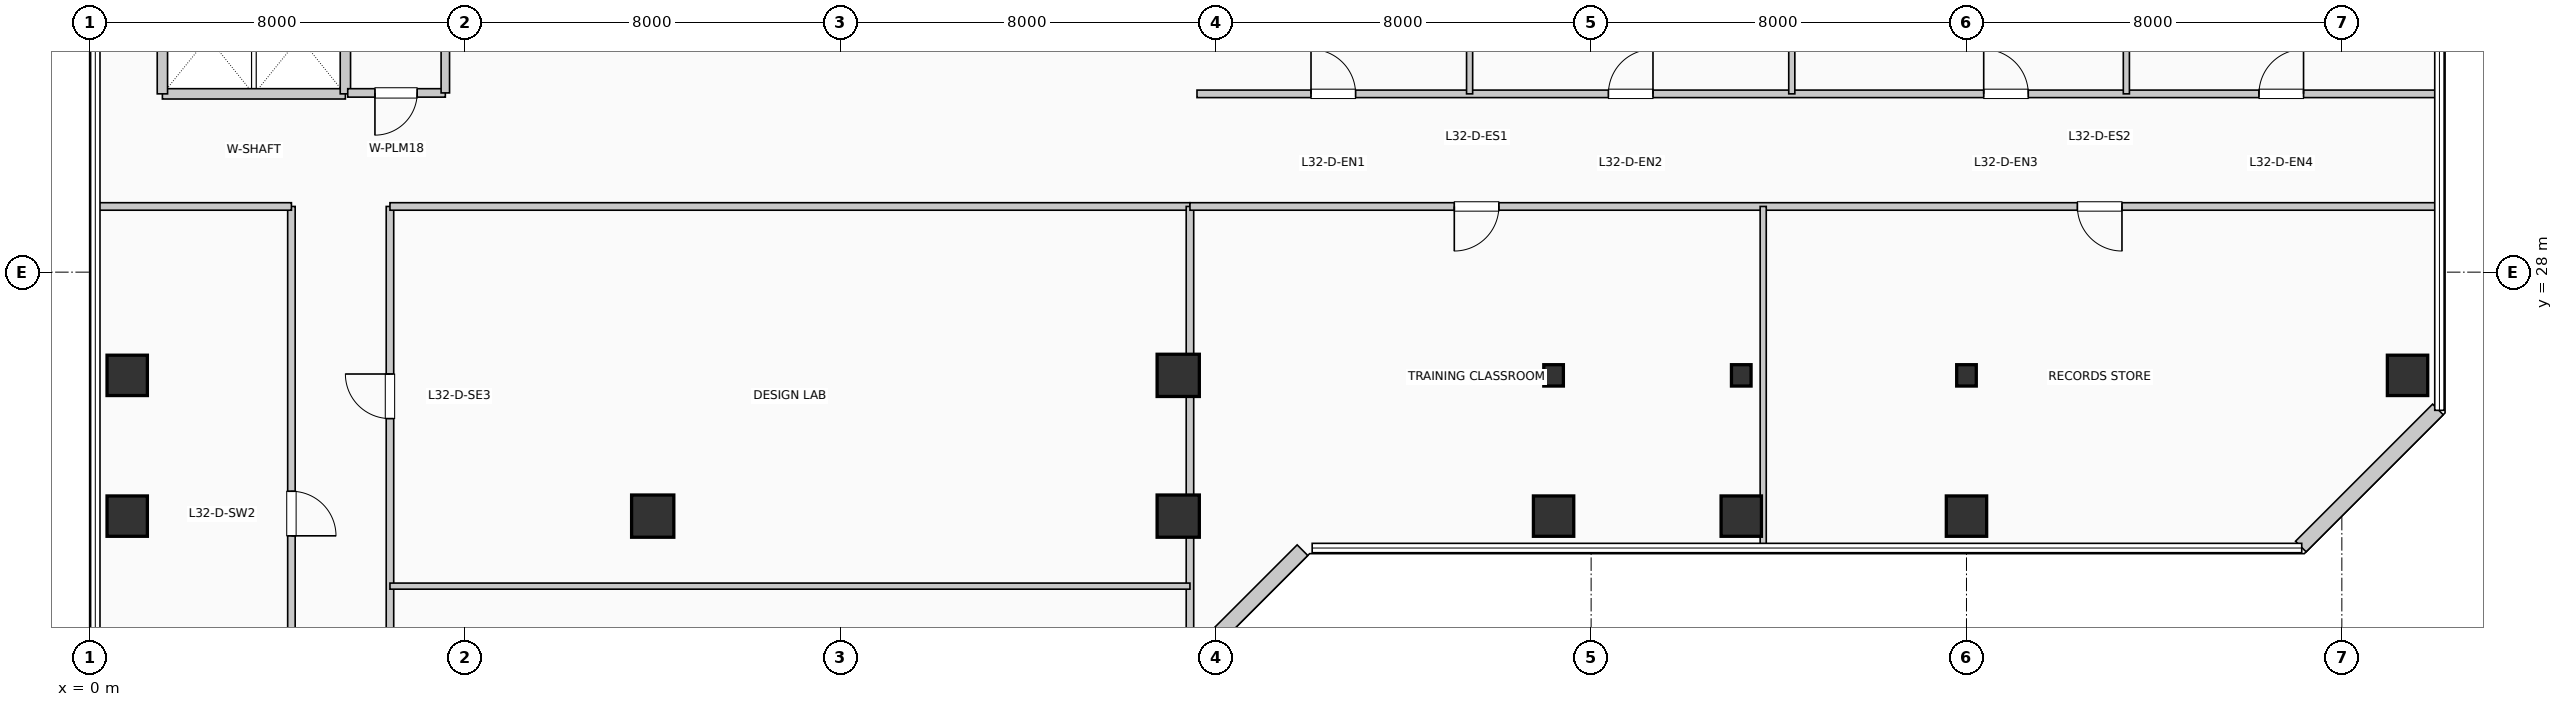
"""IFC4 building model, lengths in metres.
Left out: names, types, materials, properties, quantities, classifications, styles, units other than length and angle.
Written with IfcOpenShell. Run it as: python <this file> out.ifc"""

import sys

from ifc_helpers import new_model, si_unit, direction, frame, frame_2d, origin, origin_2d, place, context, subcontext, project, spatial, rectangle, i_section, extrude, element, fill, save


model = new_model("IFC4")
c1 = context("Model", 3, precision=1e-05, world=origin(), true_north=direction((0.0, 1.0)))
c2 = subcontext(c1, "Body", "Model", "MODEL_VIEW")
j1 = project(units=[si_unit("LENGTHUNIT", "METRE"), si_unit("PLANEANGLEUNIT", "RADIAN")], contexts=[c1])
p1 = place(None, origin())
s1 = spatial("IfcSite", under=j1, at=p1, CompositionType="ELEMENT")
p2 = place(p1, origin())
s2 = spatial("IfcBuilding", under=s1, at=p2, CompositionType="ELEMENT")
p3 = place(p2, frame((0.0, 0.0, 134.97)))
s3 = spatial("IfcBuildingStorey", under=s2, at=p3, CompositionType="ELEMENT", Elevation=134.97)
for number, where, z_axis, x_axis in (
    (1, (0.8, 22.8, 0.0), (0.0, 0.0, 1.0), (1.0, 0.0, 0.0)),
    (2, (0.8, 25.8, 0.0), (0.0, 0.0, 1.0), (1.0, 0.0, 0.0)),
):
    element("IfcColumn", number, at=place(p3, frame(where, z_axis=z_axis, x_axis=x_axis)), inside=s3, PredefinedType="COLUMN", context=c2, shape_type="SweptSolid", body=[
        extrude(rectangle(XDim=0.86, YDim=0.86, at=origin_2d()), origin(), (0.0, 0.0, 1.0), 3.96),
    ])
for number, where, z_axis, x_axis in (
    (3, (12.0, 22.8, 0.0), (0.0, 0.0, 1.0), (1.0, 0.0, 0.0)),
    (4, (23.2, 22.8, 0.0), (0.0, 0.0, 1.0), (1.0, 0.0, 0.0)),
    (5, (23.2, 25.8, 0.0), (0.0, 0.0, 1.0), (1.0, 0.0, 0.0)),
):
    element("IfcColumn", number, at=place(p3, frame(where, z_axis=z_axis, x_axis=x_axis)), inside=s3, PredefinedType="COLUMN", context=c2, shape_type="SweptSolid", body=[
        extrude(rectangle(XDim=0.9, YDim=0.9, at=origin_2d()), origin(), (0.0, 0.0, 1.0), 3.96),
    ])
p4 = place(p3, frame((31.2, 22.8, 0.0), z_axis=(0.0, 0.0, 1.0), x_axis=(1.0, 0.0, 0.0)))
e6 = element("IfcColumn", 6, at=p4, inside=s3, PredefinedType="COLUMN", context=c2, shape_type="SweptSolid", body=[
    extrude(rectangle(XDim=0.86, YDim=0.86, at=origin_2d()), origin(), (0.0, 0.0, 1.0), 3.96),
])
p5 = place(p3, frame((31.2, 25.8, 0.0), z_axis=(0.0, 0.0, 1.0), x_axis=(1.0, 0.0, 0.0)))
e7 = element("IfcColumn", 7, at=p5, inside=s3, PredefinedType="COLUMN", context=c2, shape_type="SweptSolid", body=[
    extrude(i_section(OverallWidth=0.418, OverallDepth=0.455, WebThickness=0.032, FlangeThickness=0.051, at=origin_2d()), origin(), (0.0, 0.0, 1.0), 3.96),
])
p6 = place(p3, frame((35.2, 22.8, 0.0), z_axis=(0.0, 0.0, 1.0), x_axis=(1.0, 0.0, 0.0)))
e8 = element("IfcColumn", 8, at=p6, inside=s3, PredefinedType="COLUMN", context=c2, shape_type="SweptSolid", body=[
    extrude(rectangle(XDim=0.86, YDim=0.86, at=origin_2d()), origin(), (0.0, 0.0, 1.0), 3.96),
])
p7 = place(p3, frame((35.2, 25.8, 0.0), z_axis=(0.0, 0.0, 1.0), x_axis=(1.0, 0.0, 0.0)))
e9 = element("IfcColumn", 9, at=p7, inside=s3, PredefinedType="COLUMN", context=c2, shape_type="SweptSolid", body=[
    extrude(i_section(OverallWidth=0.418, OverallDepth=0.455, WebThickness=0.032, FlangeThickness=0.051, at=origin_2d()), origin(), (0.0, 0.0, 1.0), 3.96),
])
p8 = place(p3, frame((40.0, 22.8, 0.0), z_axis=(0.0, 0.0, 1.0), x_axis=(1.0, 0.0, 0.0)))
e10 = element("IfcColumn", 10, at=p8, inside=s3, PredefinedType="COLUMN", context=c2, shape_type="SweptSolid", body=[
    extrude(rectangle(XDim=0.86, YDim=0.86, at=origin_2d()), origin(), (0.0, 0.0, 1.0), 3.96),
])
p9 = place(p3, frame((40.0, 25.8, 0.0), z_axis=(0.0, 0.0, 1.0), x_axis=(1.0, 0.0, 0.0)))
e11 = element("IfcColumn", 11, at=p9, inside=s3, PredefinedType="COLUMN", context=c2, shape_type="SweptSolid", body=[
    extrude(i_section(OverallWidth=0.418, OverallDepth=0.455, WebThickness=0.032, FlangeThickness=0.051, at=origin_2d()), origin(), (0.0, 0.0, 1.0), 3.96),
])
p10 = place(p3, frame((49.4, 25.8, 0.0), z_axis=(0.0, 0.0, 1.0), x_axis=(1.0, 0.0, 0.0)))
e12 = element("IfcColumn", 12, at=p10, inside=s3, PredefinedType="COLUMN", context=c2, shape_type="SweptSolid", body=[
    extrude(rectangle(XDim=0.86, YDim=0.86, at=origin_2d()), origin(), (0.0, 0.0, 1.0), 3.96),
])
p11 = place(p3, frame((23.926, 20.152, 0.0), z_axis=(0.0, 0.0, 1.0), x_axis=(0.707106781187, 0.707106781187, 0.0)))
e13 = element("IfcWall", 13, at=p11, inside=s3, PredefinedType="SOLIDWALL", context=c2, shape_type="SweptSolid", body=[
    extrude(rectangle(XDim=2.718, YDim=0.32, at=frame_2d((1.359, 0.0))), origin(), (0.0, 0.0, 1.0), 3.71),
])
p12 = place(p3, frame((47.126, 22.152, 0.0), z_axis=(0.0, 0.0, 1.0), x_axis=(0.707136318428, 0.707077242712, 0.0)))
e14 = element("IfcWall", 14, at=p12, inside=s3, PredefinedType="SOLIDWALL", context=c2, shape_type="SweptSolid", body=[
    extrude(rectangle(XDim=4.133, YDim=0.32, at=frame_2d((2.066, 0.0))), origin(), (0.0, 0.0, 1.0), 3.71),
])
p13 = place(p3, frame((1.55, 31.8, 0.0), z_axis=(0.0, 0.0, 1.0), x_axis=(1.0, 0.0, 0.0)))
e15 = element("IfcWall", 15, at=p13, inside=s3, PredefinedType="PARTITIONING", context=c2, shape_type="SweptSolid", body=[
    extrude(rectangle(XDim=3.9, YDim=0.22, at=frame_2d((1.95, 0.0))), origin(), (0.0, 0.0, 1.0), 3.71),
])
for number, where, z_axis, x_axis in (
    (16, (1.55, 31.8, 0.0), (0.0, 0.0, 1.0), (0.0, 1.0, 0.0)),
    (17, (5.45, 31.8, 0.0), (0.0, 0.0, 1.0), (0.0, 1.0, 0.0)),
):
    element("IfcWall", number, at=place(p3, frame(where, z_axis=z_axis, x_axis=x_axis)), inside=s3, PredefinedType="PARTITIONING", context=c2, shape_type="SweptSolid", body=[
        extrude(rectangle(XDim=2.38, YDim=0.22, at=frame_2d((1.19, 0.0))), origin(), (0.0, 0.0, 1.0), 3.71),
    ])
p14 = place(p3, frame((5.5, 31.82, 0.0), z_axis=(0.0, 0.0, 1.0), x_axis=(1.0, 0.0, 0.0)))
e18 = element("IfcWall", 18, at=p14, inside=s3, PredefinedType="PLUMBINGWALL", context=c2, shape_type="SweptSolid", body=[
    extrude(rectangle(XDim=2.08, YDim=0.18, at=frame_2d((1.04, 0.0))), origin(), (0.0, 0.0, 1.0), 3.71),
])
p15 = place(p14, frame((1.48, 0.0, 0.0), z_axis=(0.0, 0.0, 1.0), x_axis=(-1.0, 0.0, 0.0)))
e19 = element("IfcOpeningElement", 19, at=p15, cuts=e18, PredefinedType="OPENING", context=c2, shape_type="SweptSolid", body=[
    extrude(rectangle(XDim=0.9, YDim=2.1, at=frame_2d((0.45, 1.05))), frame((0.0, 0.1, 0.0), z_axis=(0.0, -1.0, 0.0), x_axis=(1.0, 0.0, 0.0)), (0.0, 0.0, 1.0), 0.2),
])
p16 = place(p3, frame((7.58, 31.82, 0.0), z_axis=(0.0, 0.0, 1.0), x_axis=(0.0, 1.0, 0.0)))
e20 = element("IfcWall", 20, at=p16, inside=s3, PredefinedType="PLUMBINGWALL", context=c2, shape_type="SweptSolid", body=[
    extrude(rectangle(XDim=2.36, YDim=0.18, at=frame_2d((1.18, 0.0))), origin(), (0.0, 0.0, 1.0), 3.71),
])
p17 = place(p3, frame((4.3, 5.6, 0.0), z_axis=(0.0, 0.0, 1.0), x_axis=(0.0, 1.0, 0.0)))
e21 = element("IfcWall", 21, at=p17, inside=s3, PredefinedType="PARTITIONING", context=c2, shape_type="SweptSolid", body=[
    extrude(rectangle(XDim=23.8, YDim=0.16, at=frame_2d((11.9, 0.0))), origin(), (0.0, 0.0, 1.0), 3.71),
])
p18 = place(p17, frame((5.83, 0.0, 0.0), z_axis=(0.0, 0.0, 1.0), x_axis=(-1.0, 0.0, 0.0)))
e22 = element("IfcOpeningElement", 22, at=p18, cuts=e21, PredefinedType="OPENING", context=c2, shape_type="SweptSolid", body=[
    extrude(rectangle(XDim=0.95, YDim=2.15, at=frame_2d((0.475, 1.075))), frame((0.0, 0.09, 0.0), z_axis=(0.0, -1.0, 0.0), x_axis=(1.0, 0.0, 0.0)), (0.0, 0.0, 1.0), 0.18),
])
p19 = place(p17, frame((17.73, 0.0, 0.0), z_axis=(0.0, 0.0, 1.0), x_axis=(-1.0, 0.0, 0.0)))
e23 = element("IfcOpeningElement", 23, at=p19, cuts=e21, PredefinedType="OPENING", context=c2, shape_type="SweptSolid", body=[
    extrude(rectangle(XDim=0.95, YDim=2.15, at=frame_2d((0.475, 1.075))), frame((0.0, 0.09, 0.0), z_axis=(0.0, -1.0, 0.0), x_axis=(1.0, 0.0, 0.0)), (0.0, 0.0, 1.0), 0.18),
])
p20 = place(p3, frame((6.4, 5.6, 0.0), z_axis=(0.0, 0.0, 1.0), x_axis=(0.0, 1.0, 0.0)))
e24 = element("IfcWall", 24, at=p20, inside=s3, PredefinedType="PARTITIONING", context=c2, shape_type="SweptSolid", body=[
    extrude(rectangle(XDim=23.8, YDim=0.16, at=frame_2d((11.9, 0.0))), origin(), (0.0, 0.0, 1.0), 3.71),
])
p21 = place(p20, frame((3.333, 0.0, 0.0)))
e25 = element("IfcOpeningElement", 25, at=p21, cuts=e24, PredefinedType="OPENING", context=c2, shape_type="SweptSolid", body=[
    extrude(rectangle(XDim=0.95, YDim=2.15, at=frame_2d((0.475, 1.075))), frame((0.0, 0.09, 0.0), z_axis=(0.0, -1.0, 0.0), x_axis=(1.0, 0.0, 0.0)), (0.0, 0.0, 1.0), 0.18),
])
p22 = place(p20, frame((11.187, 0.0, 0.0)))
e26 = element("IfcOpeningElement", 26, at=p22, cuts=e24, PredefinedType="OPENING", context=c2, shape_type="SweptSolid", body=[
    extrude(rectangle(XDim=0.95, YDim=2.15, at=frame_2d((0.475, 1.075))), frame((0.0, 0.09, 0.0), z_axis=(0.0, -1.0, 0.0), x_axis=(1.0, 0.0, 0.0)), (0.0, 0.0, 1.0), 0.18),
])
p23 = place(p20, frame((19.279, 0.0, 0.0)))
e27 = element("IfcOpeningElement", 27, at=p23, cuts=e24, PredefinedType="OPENING", context=c2, shape_type="SweptSolid", body=[
    extrude(rectangle(XDim=0.95, YDim=2.15, at=frame_2d((0.475, 1.075))), frame((0.0, 0.09, 0.0), z_axis=(0.0, -1.0, 0.0), x_axis=(1.0, 0.0, 0.0)), (0.0, 0.0, 1.0), 0.18),
])
p24 = place(p3, frame((0.19, 29.4, 0.0), z_axis=(0.0, 0.0, 1.0), x_axis=(1.0, 0.0, 0.0)))
e28 = element("IfcWall", 28, at=p24, inside=s3, PredefinedType="PARTITIONING", context=c2, shape_type="SweptSolid", body=[
    extrude(rectangle(XDim=4.11, YDim=0.16, at=frame_2d((2.055, 0.0))), origin(), (0.0, 0.0, 1.0), 3.365),
])
p25 = place(p3, frame((6.4, 29.4, 0.0), z_axis=(0.0, 0.0, 1.0), x_axis=(1.0, 0.0, 0.0)))
e29 = element("IfcWall", 29, at=p25, inside=s3, PredefinedType="PARTITIONING", context=c2, shape_type="SweptSolid", body=[
    extrude(rectangle(XDim=17.05, YDim=0.16, at=frame_2d((8.525, 0.0))), origin(), (0.0, 0.0, 1.0), 3.365),
])
p26 = place(p3, frame((23.45, 0.19, 0.0), z_axis=(0.0, 0.0, 1.0), x_axis=(0.0, 1.0, 0.0)))
e30 = element("IfcWall", 30, at=p26, inside=s3, PredefinedType="PARTITIONING", context=c2, shape_type="SweptSolid", body=[
    extrude(rectangle(XDim=29.21, YDim=0.16, at=frame_2d((14.605, 0.0))), origin(), (0.0, 0.0, 1.0), 3.045),
])
p27 = place(p3, frame((6.4, 21.308, 0.0), z_axis=(0.0, 0.0, 1.0), x_axis=(1.0, 0.0, 0.0)))
e31 = element("IfcWall", 31, at=p27, inside=s3, PredefinedType="PARTITIONING", context=c2, shape_type="SweptSolid", body=[
    extrude(rectangle(XDim=17.05, YDim=0.13, at=frame_2d((8.525, 0.0))), origin(), (0.0, 0.0, 1.0), 3.71),
])
p28 = place(p3, frame((23.45, 29.4, 0.0), z_axis=(0.0, 0.0, 1.0), x_axis=(1.0, 0.0, 0.0)))
e32 = element("IfcWall", 32, at=p28, inside=s3, PredefinedType="PARTITIONING", context=c2, shape_type="SweptSolid", body=[
    extrude(rectangle(XDim=26.56, YDim=0.16, at=frame_2d((13.28, 0.0))), origin(), (0.0, 0.0, 1.0), 3.365),
])
p29 = place(p28, frame((6.584, 0.0, 0.0), z_axis=(0.0, 0.0, 1.0), x_axis=(-1.0, 0.0, 0.0)))
e33 = element("IfcOpeningElement", 33, at=p29, cuts=e32, PredefinedType="OPENING", context=c2, shape_type="SweptSolid", body=[
    extrude(rectangle(XDim=0.95, YDim=2.15, at=frame_2d((0.475, 1.075))), frame((0.0, 0.09, 0.0), z_axis=(0.0, -1.0, 0.0), x_axis=(1.0, 0.0, 0.0)), (0.0, 0.0, 1.0), 0.18),
])
p30 = place(p28, frame((19.864, 0.0, 0.0), z_axis=(0.0, 0.0, 1.0), x_axis=(-1.0, 0.0, 0.0)))
e34 = element("IfcOpeningElement", 34, at=p30, cuts=e32, PredefinedType="OPENING", context=c2, shape_type="SweptSolid", body=[
    extrude(rectangle(XDim=0.95, YDim=2.15, at=frame_2d((0.475, 1.075))), frame((0.0, 0.09, 0.0), z_axis=(0.0, -1.0, 0.0), x_axis=(1.0, 0.0, 0.0)), (0.0, 0.0, 1.0), 0.18),
])
p31 = place(p3, frame((23.6, 31.8, 0.0), z_axis=(0.0, 0.0, 1.0), x_axis=(1.0, 0.0, 0.0)))
e35 = element("IfcWall", 35, at=p31, inside=s3, PredefinedType="PARTITIONING", context=c2, shape_type="SweptSolid", body=[
    extrude(rectangle(XDim=26.41, YDim=0.16, at=frame_2d((13.205, 0.0))), origin(), (0.0, 0.0, 1.0), 3.71),
])
p32 = place(p31, frame((2.43, 0.0, 0.0)))
e36 = element("IfcOpeningElement", 36, at=p32, cuts=e35, PredefinedType="OPENING", context=c2, shape_type="SweptSolid", body=[
    extrude(rectangle(XDim=0.95, YDim=2.15, at=frame_2d((0.475, 1.075))), frame((0.0, 0.09, 0.0), z_axis=(0.0, -1.0, 0.0), x_axis=(1.0, 0.0, 0.0)), (0.0, 0.0, 1.0), 0.18),
])
p33 = place(p31, frame((8.769, 0.0, 0.0)))
e37 = element("IfcOpeningElement", 37, at=p33, cuts=e35, PredefinedType="OPENING", context=c2, shape_type="SweptSolid", body=[
    extrude(rectangle(XDim=0.95, YDim=2.15, at=frame_2d((0.475, 1.075))), frame((0.0, 0.09, 0.0), z_axis=(0.0, -1.0, 0.0), x_axis=(1.0, 0.0, 0.0)), (0.0, 0.0, 1.0), 0.18),
])
p34 = place(p31, frame((16.767, 0.0, 0.0)))
e38 = element("IfcOpeningElement", 38, at=p34, cuts=e35, PredefinedType="OPENING", context=c2, shape_type="SweptSolid", body=[
    extrude(rectangle(XDim=0.95, YDim=2.15, at=frame_2d((0.475, 1.075))), frame((0.0, 0.09, 0.0), z_axis=(0.0, -1.0, 0.0), x_axis=(1.0, 0.0, 0.0)), (0.0, 0.0, 1.0), 0.18),
])
p35 = place(p31, frame((22.634, 0.0, 0.0)))
e39 = element("IfcOpeningElement", 39, at=p35, cuts=e35, PredefinedType="OPENING", context=c2, shape_type="SweptSolid", body=[
    extrude(rectangle(XDim=0.95, YDim=2.15, at=frame_2d((0.475, 1.075))), frame((0.0, 0.09, 0.0), z_axis=(0.0, -1.0, 0.0), x_axis=(1.0, 0.0, 0.0)), (0.0, 0.0, 1.0), 0.18),
])
p36 = place(p3, frame((35.667, 22.19, 0.0), z_axis=(0.0, 0.0, 1.0), x_axis=(0.0, 1.0, 0.0)))
e40 = element("IfcWall", 40, at=p36, inside=s3, PredefinedType="PARTITIONING", context=c2, shape_type="SweptSolid", body=[
    extrude(rectangle(XDim=7.21, YDim=0.13, at=frame_2d((3.605, 0.0))), origin(), (0.0, 0.0, 1.0), 3.045),
])
for number, where, z_axis, x_axis in (
    (41, (29.41, 31.8, 0.0), (0.0, 0.0, 1.0), (0.0, 1.0, 0.0)),
    (42, (36.277, 31.8, 0.0), (0.0, 0.0, 1.0), (0.0, 1.0, 0.0)),
    (43, (43.407, 31.8, 0.0), (0.0, 0.0, 1.0), (0.0, 1.0, 0.0)),
):
    element("IfcWall", number, at=place(p3, frame(where, z_axis=z_axis, x_axis=x_axis)), inside=s3, PredefinedType="PARTITIONING", context=c2, shape_type="SweptSolid", body=[
        extrude(rectangle(XDim=14.01, YDim=0.13, at=frame_2d((7.005, 0.0))), origin(), (0.0, 0.0, 1.0), 3.71),
    ])
p37 = place(p15, origin())
e44 = element("IfcDoor", 44, at=p37, inside=s3, OperationType="SINGLE_SWING_LEFT", PredefinedType="DOOR", context=c2, shape_type="SweptSolid", body=[
    extrude(rectangle(XDim=0.9, YDim=2.1, at=frame_2d((0.45, 1.05))), frame((0.0, 0.025, 0.0), z_axis=(0.0, -1.0, 0.0), x_axis=(1.0, 0.0, 0.0)), (0.0, 0.0, 1.0), 0.05),
])
fill(e19, e44)
p38 = place(p19, origin())
e45 = element("IfcDoor", 45, at=p38, inside=s3, OperationType="SINGLE_SWING_LEFT", PredefinedType="DOOR", context=c2, shape_type="SweptSolid", body=[
    extrude(rectangle(XDim=0.95, YDim=2.15, at=frame_2d((0.475, 1.075))), frame((0.0, 0.025, 0.0), z_axis=(0.0, -1.0, 0.0), x_axis=(1.0, 0.0, 0.0)), (0.0, 0.0, 1.0), 0.05),
])
fill(e23, e45)
p39 = place(p23, origin())
e46 = element("IfcDoor", 46, at=p39, inside=s3, OperationType="SINGLE_SWING_RIGHT", PredefinedType="DOOR", context=c2, shape_type="SweptSolid", body=[
    extrude(rectangle(XDim=0.95, YDim=2.15, at=frame_2d((0.475, 1.075))), frame((0.0, 0.025, 0.0), z_axis=(0.0, -1.0, 0.0), x_axis=(1.0, 0.0, 0.0)), (0.0, 0.0, 1.0), 0.05),
])
fill(e27, e46)
p40 = place(p29, origin())
e47 = element("IfcDoor", 47, at=p40, inside=s3, OperationType="SINGLE_SWING_LEFT", PredefinedType="DOOR", context=c2, shape_type="SweptSolid", body=[
    extrude(rectangle(XDim=0.95, YDim=2.15, at=frame_2d((0.475, 1.075))), frame((0.0, 0.025, 0.0), z_axis=(0.0, -1.0, 0.0), x_axis=(1.0, 0.0, 0.0)), (0.0, 0.0, 1.0), 0.05),
])
fill(e33, e47)
p41 = place(p30, origin())
e48 = element("IfcDoor", 48, at=p41, inside=s3, OperationType="SINGLE_SWING_RIGHT", PredefinedType="DOOR", context=c2, shape_type="SweptSolid", body=[
    extrude(rectangle(XDim=0.95, YDim=2.15, at=frame_2d((0.475, 1.075))), frame((0.0, 0.025, 0.0), z_axis=(0.0, -1.0, 0.0), x_axis=(1.0, 0.0, 0.0)), (0.0, 0.0, 1.0), 0.05),
])
fill(e34, e48)
p42 = place(p32, origin())
e49 = element("IfcDoor", 49, at=p42, inside=s3, OperationType="SINGLE_SWING_LEFT", PredefinedType="DOOR", context=c2, shape_type="SweptSolid", body=[
    extrude(rectangle(XDim=0.95, YDim=2.15, at=frame_2d((0.475, 1.075))), frame((0.0, 0.025, 0.0), z_axis=(0.0, -1.0, 0.0), x_axis=(1.0, 0.0, 0.0)), (0.0, 0.0, 1.0), 0.05),
])
fill(e36, e49)
p43 = place(p33, origin())
e50 = element("IfcDoor", 50, at=p43, inside=s3, OperationType="SINGLE_SWING_RIGHT", PredefinedType="DOOR", context=c2, shape_type="SweptSolid", body=[
    extrude(rectangle(XDim=0.95, YDim=2.15, at=frame_2d((0.475, 1.075))), frame((0.0, 0.025, 0.0), z_axis=(0.0, -1.0, 0.0), x_axis=(1.0, 0.0, 0.0)), (0.0, 0.0, 1.0), 0.05),
])
fill(e37, e50)
p44 = place(p34, origin())
e51 = element("IfcDoor", 51, at=p44, inside=s3, OperationType="SINGLE_SWING_LEFT", PredefinedType="DOOR", context=c2, shape_type="SweptSolid", body=[
    extrude(rectangle(XDim=0.95, YDim=2.15, at=frame_2d((0.475, 1.075))), frame((0.0, 0.025, 0.0), z_axis=(0.0, -1.0, 0.0), x_axis=(1.0, 0.0, 0.0)), (0.0, 0.0, 1.0), 0.05),
])
fill(e38, e51)
p45 = place(p35, origin())
e52 = element("IfcDoor", 52, at=p45, inside=s3, OperationType="SINGLE_SWING_RIGHT", PredefinedType="DOOR", context=c2, shape_type="SweptSolid", body=[
    extrude(rectangle(XDim=0.95, YDim=2.15, at=frame_2d((0.475, 1.075))), frame((0.0, 0.025, 0.0), z_axis=(0.0, -1.0, 0.0), x_axis=(1.0, 0.0, 0.0)), (0.0, 0.0, 1.0), 0.05),
])
fill(e39, e52)
save(model, sys.argv[1])
